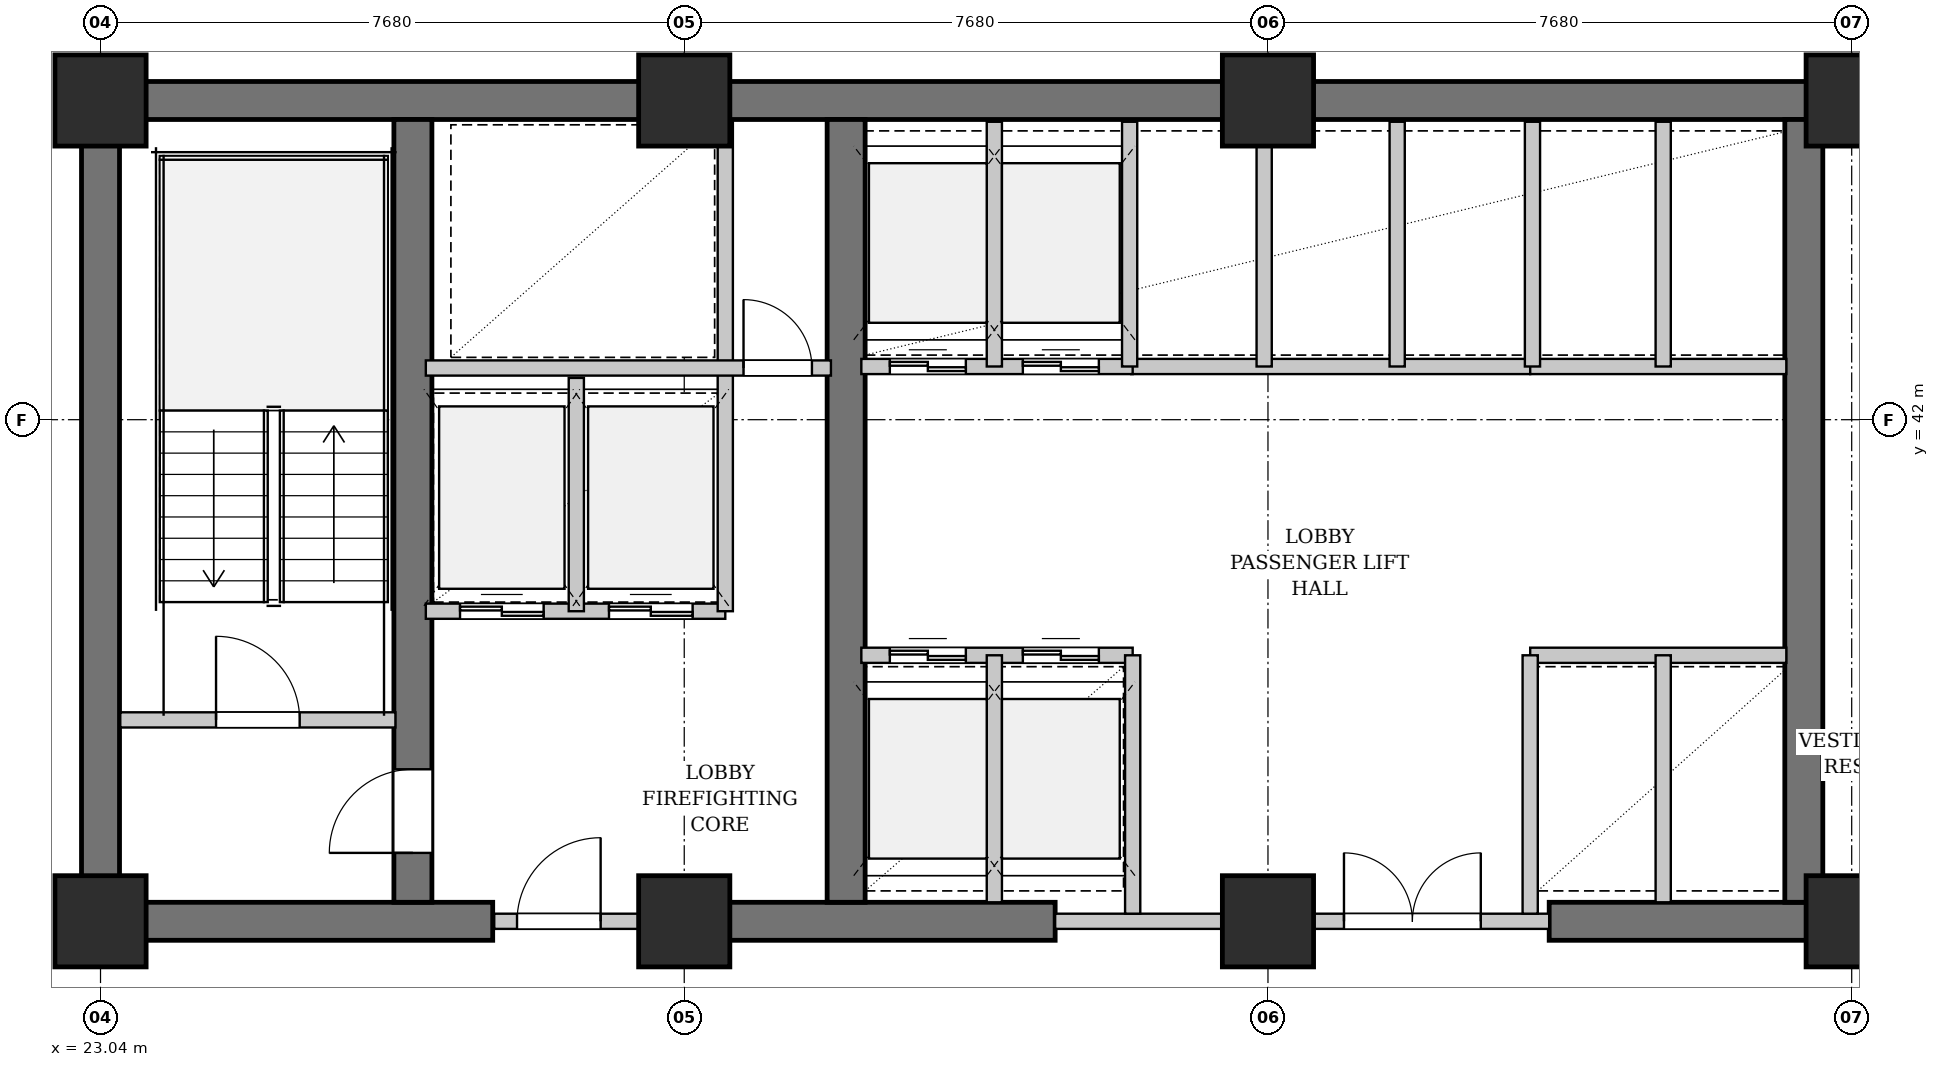
"""IFC4 building model, lengths in metres.
Left out: names, types, materials, properties, quantities, classifications, styles, units other than length and angle.
Written with IfcOpenShell. Run it as: python <this file> out.ifc"""

import sys

from ifc_helpers import new_model, si_unit, direction, frame, frame_2d, origin, origin_2d, place, context, subcontext, project, spatial, rectangle, extrude, element, fill, save


model = new_model("IFC4")
c1 = context("Model", 3, precision=1e-05, world=origin(), true_north=direction((0.0, 1.0)))
c2 = subcontext(c1, "Body", "Model", "MODEL_VIEW")
j1 = project(units=[si_unit("LENGTHUNIT", "METRE"), si_unit("PLANEANGLEUNIT", "RADIAN")], contexts=[c1])
p1 = place(None, origin())
s1 = spatial("IfcSite", under=j1, at=p1, CompositionType="ELEMENT")
p2 = place(p1, origin())
s2 = spatial("IfcBuilding", under=s1, at=p2, CompositionType="ELEMENT")
p3 = place(p2, frame((0.0, 0.0, 47.4)))
s3 = spatial("IfcBuildingStorey", under=s2, at=p3, CompositionType="ELEMENT", Elevation=47.4)
p4 = place(p3, frame((22.79, 46.2, 0.0), z_axis=(0.0, 0.0, 1.0), x_axis=(1.0, 0.0, 0.0)))
e1 = element("IfcWall", 1, at=p4, inside=s3, PredefinedType="SHEAR", context=c2, shape_type="SweptSolid", body=[
    extrude(rectangle(XDim=31.22, YDim=0.5, at=frame_2d((15.61, 0.0))), origin(), (0.0, 0.0, 1.0), 3.18),
])
p5 = place(p3, frame((22.79, 35.4, 0.0), z_axis=(0.0, 0.0, 1.0), x_axis=(1.0, 0.0, 0.0)))
e2 = element("IfcWall", 2, at=p5, inside=s3, PredefinedType="SHEAR", context=c2, shape_type="SweptSolid", body=[
    extrude(rectangle(XDim=5.41, YDim=0.5, at=frame_2d((2.705, 0.0))), origin(), (0.0, 0.0, 1.0), 3.18),
])
p6 = place(p3, frame((30.72, 35.4, 0.0), z_axis=(0.0, 0.0, 1.0), x_axis=(1.0, 0.0, 0.0)))
e3 = element("IfcWall", 3, at=p6, inside=s3, PredefinedType="SHEAR", context=c2, shape_type="SweptSolid", body=[
    extrude(rectangle(XDim=4.88, YDim=0.5, at=frame_2d((2.44, 0.0))), origin(), (0.0, 0.0, 1.0), 3.18),
])
p7 = place(p3, frame((42.1, 35.4, 0.0), z_axis=(0.0, 0.0, 1.0), x_axis=(1.0, 0.0, 0.0)))
e4 = element("IfcWall", 4, at=p7, inside=s3, PredefinedType="SHEAR", context=c2, shape_type="SweptSolid", body=[
    extrude(rectangle(XDim=8.05, YDim=0.5, at=frame_2d((4.025, 0.0))), origin(), (0.0, 0.0, 1.0), 3.18),
])
p8 = place(p7, frame((4.85, 0.0, 0.0)))
e5 = element("IfcOpeningElement", 5, at=p8, cuts=e4, PredefinedType="OPENING", context=c2, shape_type="SweptSolid", body=[
    extrude(rectangle(XDim=0.9, YDim=2.15, at=frame_2d((0.45, 1.075))), frame((0.0, 0.26, 0.0), z_axis=(0.0, -1.0, 0.0), x_axis=(1.0, 0.0, 0.0)), (0.0, 0.0, 1.0), 0.52),
])
p9 = place(p3, frame((23.04, 35.65, 0.0), z_axis=(0.0, 0.0, 1.0), x_axis=(0.0, 1.0, 0.0)))
e6 = element("IfcWall", 6, at=p9, inside=s3, PredefinedType="SHEAR", context=c2, shape_type="SweptSolid", body=[
    extrude(rectangle(XDim=10.3, YDim=0.5, at=frame_2d((5.15, 0.0))), origin(), (0.0, 0.0, 1.0), 3.18),
])
p10 = place(p3, frame((27.15, 35.65, 0.0), z_axis=(0.0, 0.0, 1.0), x_axis=(0.0, 1.0, 0.0)))
e7 = element("IfcWall", 7, at=p10, inside=s3, PredefinedType="SHEAR", context=c2, shape_type="SweptSolid", body=[
    extrude(rectangle(XDim=10.3, YDim=0.5, at=frame_2d((5.15, 0.0))), origin(), (0.0, 0.0, 1.0), 3.18),
])
p11 = place(p10, frame((0.65, 0.0, 0.0)))
e8 = element("IfcOpeningElement", 8, at=p11, cuts=e7, PredefinedType="OPENING", context=c2, shape_type="SweptSolid", body=[
    extrude(rectangle(XDim=1.1, YDim=2.15, at=frame_2d((0.55, 1.075))), frame((0.0, 0.26, 0.0), z_axis=(0.0, -1.0, 0.0), x_axis=(1.0, 0.0, 0.0)), (0.0, 0.0, 1.0), 0.52),
])
for number, where, z_axis, x_axis in (
    (9, (32.85, 35.65, 0.0), (0.0, 0.0, 1.0), (0.0, 1.0, 0.0)),
    (10, (45.45, 35.65, 0.0), (0.0, 0.0, 1.0), (0.0, 1.0, 0.0)),
):
    element("IfcWall", number, at=place(p3, frame(where, z_axis=z_axis, x_axis=x_axis)), inside=s3, PredefinedType="SHEAR", context=c2, shape_type="SweptSolid", body=[
        extrude(rectangle(XDim=10.3, YDim=0.5, at=frame_2d((5.15, 0.0))), origin(), (0.0, 0.0, 1.0), 3.18),
    ])
for number, where, z_axis, x_axis in (
    (11, (23.04, 35.4, 0.0), (0.0, 0.0, 1.0), (1.0, 0.0, 0.0)),
    (12, (23.04, 46.2, 0.0), (0.0, 0.0, 1.0), (1.0, 0.0, 0.0)),
    (13, (30.72, 35.4, 0.0), (0.0, 0.0, 1.0), (1.0, 0.0, 0.0)),
    (14, (30.72, 46.2, 0.0), (0.0, 0.0, 1.0), (1.0, 0.0, 0.0)),
    (15, (38.4, 35.4, 0.0), (0.0, 0.0, 1.0), (1.0, 0.0, 0.0)),
    (16, (38.4, 46.2, 0.0), (0.0, 0.0, 1.0), (1.0, 0.0, 0.0)),
    (17, (46.08, 35.4, 0.0), (0.0, 0.0, 1.0), (1.0, 0.0, 0.0)),
    (18, (46.08, 46.2, 0.0), (0.0, 0.0, 1.0), (1.0, 0.0, 0.0)),
):
    element("IfcColumn", number, at=place(p3, frame(where, z_axis=z_axis, x_axis=x_axis)), inside=s3, PredefinedType="COLUMN", context=c2, shape_type="SweptSolid", body=[
        extrude(rectangle(XDim=1.2, YDim=1.2, at=origin_2d()), origin(), (0.0, 0.0, 1.0), 3.4),
    ])
p12 = place(p3, frame((23.3, 38.05, 0.0), z_axis=(0.0, 0.0, 1.0), x_axis=(1.0, 0.0, 0.0)))
e19 = element("IfcWall", 19, at=p12, inside=s3, PredefinedType="PARTITIONING", context=c2, shape_type="SweptSolid", body=[
    extrude(rectangle(XDim=3.62, YDim=0.2, at=frame_2d((1.81, 0.0))), origin(), (0.0, 0.0, 1.0), 3.18),
])
p13 = place(p12, frame((1.26, 0.0, 0.0)))
e20 = element("IfcOpeningElement", 20, at=p13, cuts=e19, PredefinedType="OPENING", context=c2, shape_type="SweptSolid", body=[
    extrude(rectangle(XDim=1.1, YDim=2.15, at=frame_2d((0.55, 1.075))), frame((0.0, 0.11, 0.0), z_axis=(0.0, -1.0, 0.0), x_axis=(1.0, 0.0, 0.0)), (0.0, 0.0, 1.0), 0.22),
])
p14 = place(p3, frame((28.22, 35.4, 0.0), z_axis=(0.0, 0.0, 1.0), x_axis=(1.0, 0.0, 0.0)))
e21 = element("IfcWall", 21, at=p14, inside=s3, PredefinedType="PARTITIONING", context=c2, shape_type="SweptSolid", body=[
    extrude(rectangle(XDim=2.5, YDim=0.2, at=frame_2d((1.25, 0.0))), origin(), (0.0, 0.0, 1.0), 2.475),
])
p15 = place(p14, frame((0.3, 0.0, 0.0)))
e22 = element("IfcOpeningElement", 22, at=p15, cuts=e21, PredefinedType="OPENING", context=c2, shape_type="SweptSolid", body=[
    extrude(rectangle(XDim=1.1, YDim=2.15, at=frame_2d((0.55, 1.075))), frame((0.0, 0.11, 0.0), z_axis=(0.0, -1.0, 0.0), x_axis=(1.0, 0.0, 0.0)), (0.0, 0.0, 1.0), 0.22),
])
p16 = place(p3, frame((27.32, 39.48, 0.0), z_axis=(0.0, 0.0, 1.0), x_axis=(1.0, 0.0, 0.0)))
e23 = element("IfcWall", 23, at=p16, inside=s3, PredefinedType="PARTITIONING", context=c2, shape_type="SweptSolid", body=[
    extrude(rectangle(XDim=3.94, YDim=0.2, at=frame_2d((1.97, 0.0))), origin(), (0.0, 0.0, 1.0), 3.18),
])
p17 = place(p16, frame((0.45, 0.0, 0.0)))
e24 = element("IfcOpeningElement", 24, at=p17, cuts=e23, PredefinedType="OPENING", context=c2, shape_type="SweptSolid", body=[
    extrude(rectangle(XDim=1.1, YDim=2.2, at=frame_2d((0.55, 1.1))), frame((0.0, 0.11, 0.0), z_axis=(0.0, -1.0, 0.0), x_axis=(1.0, 0.0, 0.0)), (0.0, 0.0, 1.0), 0.22),
])
p18 = place(p16, frame((2.41, 0.0, 0.0)))
e25 = element("IfcOpeningElement", 25, at=p18, cuts=e23, PredefinedType="OPENING", context=c2, shape_type="SweptSolid", body=[
    extrude(rectangle(XDim=1.1, YDim=2.2, at=frame_2d((0.55, 1.1))), frame((0.0, 0.11, 0.0), z_axis=(0.0, -1.0, 0.0), x_axis=(1.0, 0.0, 0.0)), (0.0, 0.0, 1.0), 0.22),
])
p19 = place(p3, frame((29.3, 39.48, 0.0), z_axis=(0.0, 0.0, 1.0), x_axis=(0.0, 1.0, 0.0)))
e26 = element("IfcWall", 26, at=p19, inside=s3, PredefinedType="PARTITIONING", context=c2, shape_type="SweptSolid", body=[
    extrude(rectangle(XDim=3.07, YDim=0.2, at=frame_2d((1.535, 0.0))), origin(), (0.0, 0.0, 1.0), 3.18),
])
p20 = place(p3, frame((31.26, 39.48, 0.0), z_axis=(0.0, 0.0, 1.0), x_axis=(0.0, 1.0, 0.0)))
e27 = element("IfcWall", 27, at=p20, inside=s3, PredefinedType="PARTITIONING", context=c2, shape_type="SweptSolid", body=[
    extrude(rectangle(XDim=6.44, YDim=0.2, at=frame_2d((3.22, 0.0))), origin(), (0.0, 0.0, 1.0), 3.18),
])
p21 = place(p3, frame((27.32, 42.68, 0.0), z_axis=(0.0, 0.0, 1.0), x_axis=(1.0, 0.0, 0.0)))
e28 = element("IfcWall", 28, at=p21, inside=s3, PredefinedType="PARTITIONING", context=c2, shape_type="SweptSolid", body=[
    extrude(rectangle(XDim=5.33, YDim=0.2, at=frame_2d((2.665, 0.0))), origin(), (0.0, 0.0, 1.0), 3.18),
])
p22 = place(p21, frame((4.18, 0.0, 0.0)))
e29 = element("IfcOpeningElement", 29, at=p22, cuts=e28, PredefinedType="OPENING", context=c2, shape_type="SweptSolid", body=[
    extrude(rectangle(XDim=0.9, YDim=2.15, at=frame_2d((0.45, 1.075))), frame((0.0, 0.11, 0.0), z_axis=(0.0, -1.0, 0.0), x_axis=(1.0, 0.0, 0.0)), (0.0, 0.0, 1.0), 0.22),
])
p23 = place(p3, frame((35.6, 35.4, 0.0), z_axis=(0.0, 0.0, 1.0), x_axis=(1.0, 0.0, 0.0)))
e30 = element("IfcWall", 30, at=p23, inside=s3, PredefinedType="PARTITIONING", context=c2, shape_type="SweptSolid", body=[
    extrude(rectangle(XDim=6.5, YDim=0.2, at=frame_2d((3.25, 0.0))), origin(), (0.0, 0.0, 1.0), 2.475),
])
p24 = place(p23, frame((3.8, 0.0, 0.0)))
e31 = element("IfcOpeningElement", 31, at=p24, cuts=e30, PredefinedType="OPENING", context=c2, shape_type="SweptSolid", body=[
    extrude(rectangle(XDim=1.8, YDim=2.3, at=frame_2d((0.9, 1.15))), frame((0.0, 0.11, 0.0), z_axis=(0.0, -1.0, 0.0), x_axis=(1.0, 0.0, 0.0)), (0.0, 0.0, 1.0), 0.22),
])
p25 = place(p3, frame((36.6, 42.7, 0.0), z_axis=(0.0, 0.0, 1.0), x_axis=(1.0, 0.0, 0.0)))
e32 = element("IfcWall", 32, at=p25, inside=s3, PredefinedType="PARTITIONING", context=c2, shape_type="SweptSolid", body=[
    extrude(rectangle(XDim=5.25, YDim=0.2, at=frame_2d((2.625, 0.0))), origin(), (0.0, 0.0, 1.0), 3.18),
])
p26 = place(p3, frame((38.35, 42.7, 0.0), z_axis=(0.0, 0.0, 1.0), x_axis=(0.0, 1.0, 0.0)))
e33 = element("IfcWall", 33, at=p26, inside=s3, PredefinedType="PARTITIONING", context=c2, shape_type="SweptSolid", body=[
    extrude(rectangle(XDim=3.22, YDim=0.2, at=frame_2d((1.61, 0.0))), origin(), (0.0, 0.0, 1.0), 2.475),
])
p27 = place(p3, frame((40.1, 42.7, 0.0), z_axis=(0.0, 0.0, 1.0), x_axis=(0.0, 1.0, 0.0)))
e34 = element("IfcWall", 34, at=p27, inside=s3, PredefinedType="PARTITIONING", context=c2, shape_type="SweptSolid", body=[
    extrude(rectangle(XDim=3.22, YDim=0.2, at=frame_2d((1.61, 0.0))), origin(), (0.0, 0.0, 1.0), 3.18),
])
p28 = place(p3, frame((33.05, 38.9, 0.0), z_axis=(0.0, 0.0, 1.0), x_axis=(1.0, 0.0, 0.0)))
e35 = element("IfcWall", 35, at=p28, inside=s3, PredefinedType="PARTITIONING", context=c2, shape_type="SweptSolid", body=[
    extrude(rectangle(XDim=3.57, YDim=0.2, at=frame_2d((1.785, 0.0))), origin(), (0.0, 0.0, 1.0), 3.18),
])
p29 = place(p28, frame((0.375, 0.0, 0.0)))
e36 = element("IfcOpeningElement", 36, at=p29, cuts=e35, PredefinedType="OPENING", context=c2, shape_type="SweptSolid", body=[
    extrude(rectangle(XDim=1.0, YDim=2.2, at=frame_2d((0.5, 1.1))), frame((0.0, 0.11, 0.0), z_axis=(0.0, -1.0, 0.0), x_axis=(1.0, 0.0, 0.0)), (0.0, 0.0, 1.0), 0.22),
])
p30 = place(p28, frame((2.125, 0.0, 0.0)))
e37 = element("IfcOpeningElement", 37, at=p30, cuts=e35, PredefinedType="OPENING", context=c2, shape_type="SweptSolid", body=[
    extrude(rectangle(XDim=1.0, YDim=2.2, at=frame_2d((0.5, 1.1))), frame((0.0, 0.11, 0.0), z_axis=(0.0, -1.0, 0.0), x_axis=(1.0, 0.0, 0.0)), (0.0, 0.0, 1.0), 0.22),
])
p31 = place(p3, frame((33.05, 42.7, 0.0), z_axis=(0.0, 0.0, 1.0), x_axis=(1.0, 0.0, 0.0)))
e38 = element("IfcWall", 38, at=p31, inside=s3, PredefinedType="PARTITIONING", context=c2, shape_type="SweptSolid", body=[
    extrude(rectangle(XDim=3.57, YDim=0.2, at=frame_2d((1.785, 0.0))), origin(), (0.0, 0.0, 1.0), 3.18),
])
p32 = place(p31, frame((0.375, 0.0, 0.0)))
e39 = element("IfcOpeningElement", 39, at=p32, cuts=e38, PredefinedType="OPENING", context=c2, shape_type="SweptSolid", body=[
    extrude(rectangle(XDim=1.0, YDim=2.2, at=frame_2d((0.5, 1.1))), frame((0.0, 0.11, 0.0), z_axis=(0.0, -1.0, 0.0), x_axis=(1.0, 0.0, 0.0)), (0.0, 0.0, 1.0), 0.22),
])
p33 = place(p31, frame((2.125, 0.0, 0.0)))
e40 = element("IfcOpeningElement", 40, at=p33, cuts=e38, PredefinedType="OPENING", context=c2, shape_type="SweptSolid", body=[
    extrude(rectangle(XDim=1.0, YDim=2.2, at=frame_2d((0.5, 1.1))), frame((0.0, 0.11, 0.0), z_axis=(0.0, -1.0, 0.0), x_axis=(1.0, 0.0, 0.0)), (0.0, 0.0, 1.0), 0.22),
])
p34 = place(p3, frame((34.8, 35.65, 0.0), z_axis=(0.0, 0.0, 1.0), x_axis=(0.0, 1.0, 0.0)))
e41 = element("IfcWall", 41, at=p34, inside=s3, PredefinedType="PARTITIONING", context=c2, shape_type="SweptSolid", body=[
    extrude(rectangle(XDim=3.25, YDim=0.2, at=frame_2d((1.625, 0.0))), origin(), (0.0, 0.0, 1.0), 3.18),
])
p35 = place(p3, frame((34.8, 42.7, 0.0), z_axis=(0.0, 0.0, 1.0), x_axis=(0.0, 1.0, 0.0)))
e42 = element("IfcWall", 42, at=p35, inside=s3, PredefinedType="PARTITIONING", context=c2, shape_type="SweptSolid", body=[
    extrude(rectangle(XDim=3.22, YDim=0.2, at=frame_2d((1.61, 0.0))), origin(), (0.0, 0.0, 1.0), 3.18),
])
p36 = place(p3, frame((36.62, 35.5, 0.0), z_axis=(0.0, 0.0, 1.0), x_axis=(0.0, 1.0, 0.0)))
e43 = element("IfcWall", 43, at=p36, inside=s3, PredefinedType="PARTITIONING", context=c2, shape_type="SweptSolid", body=[
    extrude(rectangle(XDim=3.4, YDim=0.2, at=frame_2d((1.7, 0.0))), origin(), (0.0, 0.0, 1.0), 3.18),
])
p37 = place(p3, frame((36.58, 42.7, 0.0), z_axis=(0.0, 0.0, 1.0), x_axis=(0.0, 1.0, 0.0)))
e44 = element("IfcWall", 44, at=p37, inside=s3, PredefinedType="PARTITIONING", context=c2, shape_type="SweptSolid", body=[
    extrude(rectangle(XDim=3.22, YDim=0.2, at=frame_2d((1.61, 0.0))), origin(), (0.0, 0.0, 1.0), 3.18),
])
for number, where, z_axis, x_axis in (
    (45, (41.85, 38.9, 0.0), (0.0, 0.0, 1.0), (1.0, 0.0, 0.0)),
    (46, (41.85, 42.7, 0.0), (0.0, 0.0, 1.0), (1.0, 0.0, 0.0)),
):
    element("IfcWall", number, at=place(p3, frame(where, z_axis=z_axis, x_axis=x_axis)), inside=s3, PredefinedType="PARTITIONING", context=c2, shape_type="SweptSolid", body=[
        extrude(rectangle(XDim=3.37, YDim=0.2, at=frame_2d((1.685, 0.0))), origin(), (0.0, 0.0, 1.0), 3.18),
    ])
p38 = place(p3, frame((43.6, 35.65, 0.0), z_axis=(0.0, 0.0, 1.0), x_axis=(0.0, 1.0, 0.0)))
e47 = element("IfcWall", 47, at=p38, inside=s3, PredefinedType="PARTITIONING", context=c2, shape_type="SweptSolid", body=[
    extrude(rectangle(XDim=3.25, YDim=0.2, at=frame_2d((1.625, 0.0))), origin(), (0.0, 0.0, 1.0), 3.18),
])
p39 = place(p3, frame((43.6, 42.7, 0.0), z_axis=(0.0, 0.0, 1.0), x_axis=(0.0, 1.0, 0.0)))
e48 = element("IfcWall", 48, at=p39, inside=s3, PredefinedType="PARTITIONING", context=c2, shape_type="SweptSolid", body=[
    extrude(rectangle(XDim=3.22, YDim=0.2, at=frame_2d((1.61, 0.0))), origin(), (0.0, 0.0, 1.0), 3.18),
])
p40 = place(p3, frame((41.85, 35.5, 0.0), z_axis=(0.0, 0.0, 1.0), x_axis=(0.0, 1.0, 0.0)))
e49 = element("IfcWall", 49, at=p40, inside=s3, PredefinedType="PARTITIONING", context=c2, shape_type="SweptSolid", body=[
    extrude(rectangle(XDim=3.4, YDim=0.2, at=frame_2d((1.7, 0.0))), origin(), (0.0, 0.0, 1.0), 3.18),
])
p41 = place(p3, frame((41.88, 42.7, 0.0), z_axis=(0.0, 0.0, 1.0), x_axis=(0.0, 1.0, 0.0)))
e50 = element("IfcWall", 50, at=p41, inside=s3, PredefinedType="PARTITIONING", context=c2, shape_type="SweptSolid", body=[
    extrude(rectangle(XDim=3.22, YDim=0.2, at=frame_2d((1.61, 0.0))), origin(), (0.0, 0.0, 1.0), 3.18),
])
p42 = place(p13, origin())
e51 = element("IfcDoor", 51, at=p42, inside=s3, OperationType="SINGLE_SWING_LEFT", PredefinedType="DOOR", context=c2, shape_type="SweptSolid", body=[
    extrude(rectangle(XDim=1.1, YDim=2.15, at=frame_2d((0.55, 1.075))), frame((0.0, 0.025, 0.0), z_axis=(0.0, -1.0, 0.0), x_axis=(1.0, 0.0, 0.0)), (0.0, 0.0, 1.0), 0.05),
])
fill(e20, e51)
p43 = place(p15, origin())
e52 = element("IfcDoor", 52, at=p43, inside=s3, OperationType="SINGLE_SWING_RIGHT", PredefinedType="DOOR", context=c2, shape_type="SweptSolid", body=[
    extrude(rectangle(XDim=1.1, YDim=2.15, at=frame_2d((0.55, 1.075))), frame((0.0, 0.025, 0.0), z_axis=(0.0, -1.0, 0.0), x_axis=(1.0, 0.0, 0.0)), (0.0, 0.0, 1.0), 0.05),
])
fill(e22, e52)
p44 = place(p17, origin())
e53 = element("IfcDoor", 53, at=p44, inside=s3, OperationType="DOUBLE_DOOR_SLIDING", PredefinedType="DOOR", context=c2, shape_type="SweptSolid", body=[
    extrude(rectangle(XDim=1.1, YDim=2.2, at=frame_2d((0.55, 1.1))), frame((0.0, 0.025, 0.0), z_axis=(0.0, -1.0, 0.0), x_axis=(1.0, 0.0, 0.0)), (0.0, 0.0, 1.0), 0.05),
])
fill(e24, e53)
p45 = place(p18, origin())
e54 = element("IfcDoor", 54, at=p45, inside=s3, OperationType="DOUBLE_DOOR_SLIDING", PredefinedType="DOOR", context=c2, shape_type="SweptSolid", body=[
    extrude(rectangle(XDim=1.1, YDim=2.2, at=frame_2d((0.55, 1.1))), frame((0.0, 0.025, 0.0), z_axis=(0.0, -1.0, 0.0), x_axis=(1.0, 0.0, 0.0)), (0.0, 0.0, 1.0), 0.05),
])
fill(e25, e54)
p46 = place(p22, origin())
e55 = element("IfcDoor", 55, at=p46, inside=s3, OperationType="SINGLE_SWING_LEFT", PredefinedType="DOOR", context=c2, shape_type="SweptSolid", body=[
    extrude(rectangle(XDim=0.9, YDim=2.15, at=frame_2d((0.45, 1.075))), frame((0.0, 0.025, 0.0), z_axis=(0.0, -1.0, 0.0), x_axis=(1.0, 0.0, 0.0)), (0.0, 0.0, 1.0), 0.05),
])
fill(e29, e55)
p47 = place(p24, origin())
e56 = element("IfcDoor", 56, at=p47, inside=s3, OperationType="DOUBLE_DOOR_SINGLE_SWING", PredefinedType="DOOR", context=c2, shape_type="SweptSolid", body=[
    extrude(rectangle(XDim=1.8, YDim=2.3, at=frame_2d((0.9, 1.15))), frame((0.0, 0.025, 0.0), z_axis=(0.0, -1.0, 0.0), x_axis=(1.0, 0.0, 0.0)), (0.0, 0.0, 1.0), 0.05),
])
fill(e31, e56)
p48 = place(p29, origin())
e57 = element("IfcDoor", 57, at=p48, inside=s3, OperationType="DOUBLE_DOOR_SLIDING", PredefinedType="DOOR", context=c2, shape_type="SweptSolid", body=[
    extrude(rectangle(XDim=1.0, YDim=2.2, at=frame_2d((0.5, 1.1))), frame((0.0, 0.025, 0.0), z_axis=(0.0, -1.0, 0.0), x_axis=(1.0, 0.0, 0.0)), (0.0, 0.0, 1.0), 0.05),
])
fill(e36, e57)
p49 = place(p30, origin())
e58 = element("IfcDoor", 58, at=p49, inside=s3, OperationType="DOUBLE_DOOR_SLIDING", PredefinedType="DOOR", context=c2, shape_type="SweptSolid", body=[
    extrude(rectangle(XDim=1.0, YDim=2.2, at=frame_2d((0.5, 1.1))), frame((0.0, 0.025, 0.0), z_axis=(0.0, -1.0, 0.0), x_axis=(1.0, 0.0, 0.0)), (0.0, 0.0, 1.0), 0.05),
])
fill(e37, e58)
p50 = place(p32, origin())
e59 = element("IfcDoor", 59, at=p50, inside=s3, OperationType="DOUBLE_DOOR_SLIDING", PredefinedType="DOOR", context=c2, shape_type="SweptSolid", body=[
    extrude(rectangle(XDim=1.0, YDim=2.2, at=frame_2d((0.5, 1.1))), frame((0.0, 0.025, 0.0), z_axis=(0.0, -1.0, 0.0), x_axis=(1.0, 0.0, 0.0)), (0.0, 0.0, 1.0), 0.05),
])
fill(e39, e59)
p51 = place(p33, origin())
e60 = element("IfcDoor", 60, at=p51, inside=s3, OperationType="DOUBLE_DOOR_SLIDING", PredefinedType="DOOR", context=c2, shape_type="SweptSolid", body=[
    extrude(rectangle(XDim=1.0, YDim=2.2, at=frame_2d((0.5, 1.1))), frame((0.0, 0.025, 0.0), z_axis=(0.0, -1.0, 0.0), x_axis=(1.0, 0.0, 0.0)), (0.0, 0.0, 1.0), 0.05),
])
fill(e40, e60)
p52 = place(p11, origin())
e61 = element("IfcDoor", 61, at=p52, inside=s3, OperationType="SINGLE_SWING_LEFT", PredefinedType="DOOR", context=c2, shape_type="SweptSolid", body=[
    extrude(rectangle(XDim=1.1, YDim=2.15, at=frame_2d((0.55, 1.075))), frame((0.0, 0.025, 0.0), z_axis=(0.0, -1.0, 0.0), x_axis=(1.0, 0.0, 0.0)), (0.0, 0.0, 1.0), 0.05),
])
fill(e8, e61)
save(model, sys.argv[1])
